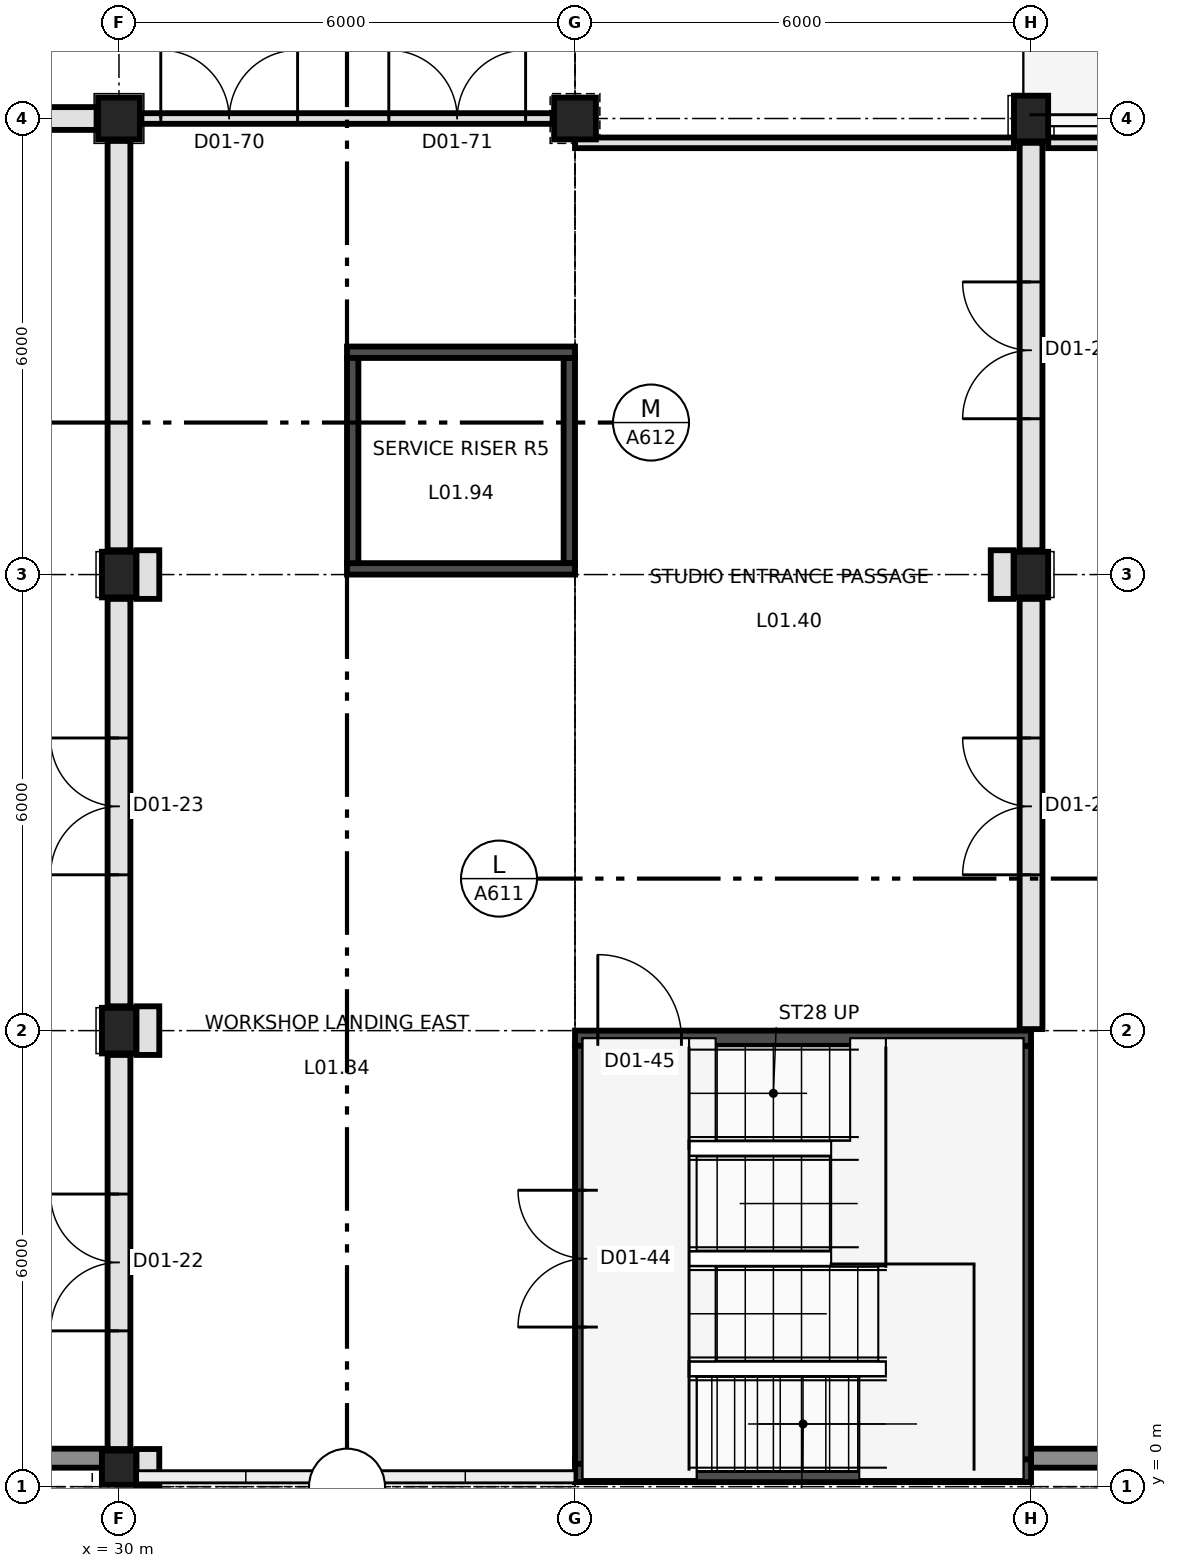
"""IFC4 building model, lengths in metres.
Left out: names, types, materials, properties, quantities, classifications, styles, units other than length and angle.
Written with IfcOpenShell. Run it as: python <this file> out.ifc"""

import sys

from ifc_helpers import new_model, si_unit, direction, frame, frame_2d, origin, origin_2d, place, context, subcontext, project, spatial, rectangle, extrude, element, fill, save


model = new_model("IFC4")
c1 = context("Model", 3, precision=1e-05, world=origin(), true_north=direction((0.0, 1.0)))
c2 = subcontext(c1, "Body", "Model", "MODEL_VIEW")
j1 = project(units=[si_unit("LENGTHUNIT", "METRE"), si_unit("PLANEANGLEUNIT", "RADIAN")], contexts=[c1])
p1 = place(None, origin())
s1 = spatial("IfcSite", under=j1, at=p1, CompositionType="ELEMENT")
p2 = place(p1, origin())
s2 = spatial("IfcBuilding", under=s1, at=p2, CompositionType="ELEMENT")
p3 = place(p2, frame((0.0, 0.0, 7.0)))
s3 = spatial("IfcBuildingStorey", under=s2, at=p3, CompositionType="ELEMENT", Elevation=7.0)
p4 = place(p3, frame((30.0, 0.25, 0.0), z_axis=(0.0, 0.0, 1.0), x_axis=(1.0, 0.0, 0.0)))
e1 = element("IfcColumn", 1, at=p4, inside=s3, PredefinedType="COLUMN", context=c2, shape_type="SweptSolid", body=[
    extrude(rectangle(XDim=0.45, YDim=0.45, at=origin_2d()), origin(), (0.0, 0.0, 1.0), 5.0),
])
for number, where, z_axis, x_axis in (
    (2, (30.0, 6.0, 0.0), (0.0, 0.0, 1.0), (1.0, 0.0, 0.0)),
    (3, (30.0, 12.0, 0.0), (0.0, 0.0, 1.0), (1.0, 0.0, 0.0)),
    (4, (42.0, 12.0, 0.0), (0.0, 0.0, 1.0), (1.0, 0.0, 0.0)),
):
    element("IfcColumn", number, at=place(p3, frame(where, z_axis=z_axis, x_axis=x_axis)), inside=s3, PredefinedType="COLUMN", context=c2, shape_type="SweptSolid", body=[
        extrude(rectangle(XDim=0.45, YDim=0.6, at=origin_2d()), origin(), (0.0, 0.0, 1.0), 5.0),
    ])
for number, where, z_axis, x_axis in (
    (5, (30.0, 18.0, 0.0), (0.0, 0.0, 1.0), (1.0, 0.0, 0.0)),
    (6, (36.0, 18.0, 0.0), (0.0, 0.0, 1.0), (1.0, 0.0, 0.0)),
):
    element("IfcColumn", number, at=place(p3, frame(where, z_axis=z_axis, x_axis=x_axis)), inside=s3, PredefinedType="COLUMN", context=c2, shape_type="SweptSolid", body=[
        extrude(rectangle(XDim=0.55, YDim=0.55, at=origin_2d()), origin(), (0.0, 0.0, 1.0), 5.0),
    ])
p5 = place(p3, frame((42.0, 18.0, 0.0), z_axis=(0.0, 0.0, 1.0), x_axis=(1.0, 0.0, 0.0)))
e7 = element("IfcColumn", 7, at=p5, inside=s3, PredefinedType="COLUMN", context=c2, shape_type="SweptSolid", body=[
    extrude(rectangle(XDim=0.45, YDim=0.6, at=origin_2d()), origin(), (0.0, 0.0, 1.0), 5.0),
])
p6 = place(p3, frame((36.0, 5.9, 0.0), z_axis=(0.0, 0.0, 1.0), x_axis=(1.0, 0.0, 0.0)))
e8 = element("IfcWall", 8, at=p6, inside=s3, PredefinedType="SHEAR", context=c2, shape_type="SweptSolid", body=[
    extrude(rectangle(XDim=6.0, YDim=0.2, at=frame_2d((3.0, 0.0))), origin(), (0.0, 0.0, 1.0), 5.0),
])
p7 = place(p6, frame((0.3, 0.0, 0.0)))
e9 = element("IfcOpeningElement", 9, at=p7, cuts=e8, PredefinedType="OPENING", context=c2, shape_type="SweptSolid", body=[
    extrude(rectangle(XDim=1.1, YDim=2.2, at=frame_2d((0.55, 1.1))), frame((0.0, 0.11, 0.0), z_axis=(0.0, -1.0, 0.0), x_axis=(1.0, 0.0, 0.0)), (0.0, 0.0, 1.0), 0.22),
])
p8 = place(p3, frame((36.0, 0.21, 0.0), z_axis=(0.0, 0.0, 1.0), x_axis=(1.0, 0.0, 0.0)))
e10 = element("IfcWall", 10, at=p8, inside=s3, PredefinedType="SHEAR", context=c2, shape_type="SweptSolid", body=[
    extrude(rectangle(XDim=6.0, YDim=0.3, at=frame_2d((3.0, 0.0))), origin(), (0.0, 0.0, 1.0), 5.0),
])
p9 = place(p3, frame((36.15, 0.3, 0.0), z_axis=(0.0, 0.0, 1.0), x_axis=(0.0, 1.0, 0.0)))
e11 = element("IfcWall", 11, at=p9, inside=s3, PredefinedType="SHEAR", context=c2, shape_type="SweptSolid", body=[
    extrude(rectangle(XDim=5.5, YDim=0.3, at=frame_2d((2.75, 0.0))), origin(), (0.0, 0.0, 1.0), 5.0),
])
p10 = place(p9, frame((1.8, 0.0, 0.0)))
e12 = element("IfcOpeningElement", 12, at=p10, cuts=e11, PredefinedType="OPENING", context=c2, shape_type="SweptSolid", body=[
    extrude(rectangle(XDim=1.8, YDim=2.2, at=frame_2d((0.9, 1.1))), frame((0.0, 0.16, 0.0), z_axis=(0.0, -1.0, 0.0), x_axis=(1.0, 0.0, 0.0)), (0.0, 0.0, 1.0), 0.32),
])
p11 = place(p3, frame((41.9, 0.3, 0.0), z_axis=(0.0, 0.0, 1.0), x_axis=(0.0, 1.0, 0.0)))
e13 = element("IfcWall", 13, at=p11, inside=s3, PredefinedType="SHEAR", context=c2, shape_type="SweptSolid", body=[
    extrude(rectangle(XDim=5.5, YDim=0.2, at=frame_2d((2.75, 0.0))), origin(), (0.0, 0.0, 1.0), 5.0),
])
for number, where, z_axis, x_axis in (
    (14, (33.0, 14.925, 0.0), (0.0, 0.0, 1.0), (1.0, 0.0, 0.0)),
    (15, (33.0, 12.075, 0.0), (0.0, 0.0, 1.0), (1.0, 0.0, 0.0)),
):
    element("IfcWall", number, at=place(p3, frame(where, z_axis=z_axis, x_axis=x_axis)), inside=s3, PredefinedType="SHEAR", context=c2, shape_type="SweptSolid", body=[
        extrude(rectangle(XDim=3.0, YDim=0.15, at=frame_2d((1.5, 0.0))), origin(), (0.0, 0.0, 1.0), 5.0),
    ])
for number, where, z_axis, x_axis in (
    (16, (33.075, 12.15, 0.0), (0.0, 0.0, 1.0), (0.0, 1.0, 0.0)),
    (17, (35.925, 12.15, 0.0), (0.0, 0.0, 1.0), (0.0, 1.0, 0.0)),
):
    element("IfcWall", number, at=place(p3, frame(where, z_axis=z_axis, x_axis=x_axis)), inside=s3, PredefinedType="SHEAR", context=c2, shape_type="SweptSolid", body=[
        extrude(rectangle(XDim=2.7, YDim=0.15, at=frame_2d((1.35, 0.0))), origin(), (0.0, 0.0, 1.0), 5.0),
    ])
p12 = place(p3, frame((47.8, 0.375, 0.0), z_axis=(0.0, 0.0, 1.0), x_axis=(-1.0, 0.0, 0.0)))
e18 = element("IfcWall", 18, at=p12, inside=s3, PredefinedType="SOLIDWALL", context=c2, shape_type="SweptSolid", body=[
    extrude(rectangle(XDim=5.8, YDim=0.25, at=frame_2d((2.9, 0.0))), origin(), (0.0, 0.0, 1.0), 9.5),
])
p13 = place(p3, frame((29.8, 0.375, 0.0), z_axis=(0.0, 0.0, 1.0), x_axis=(-1.0, 0.0, 0.0)))
e19 = element("IfcWall", 19, at=p13, inside=s3, PredefinedType="SOLIDWALL", context=c2, shape_type="SweptSolid", body=[
    extrude(rectangle(XDim=5.6, YDim=0.25, at=frame_2d((2.8, 0.0))), origin(), (0.0, 0.0, 1.0), 8.9),
])
p14 = place(p3, frame((24.32, 18.0, 0.0), z_axis=(0.0, 0.0, 1.0), x_axis=(1.0, 0.0, 0.0)))
e20 = element("IfcWall", 20, at=p14, inside=s3, PredefinedType="PARTITIONING", context=c2, shape_type="SweptSolid", body=[
    extrude(rectangle(XDim=5.385, YDim=0.3, at=frame_2d((2.692, 0.0))), origin(), (0.0, 0.0, 1.0), 4.1),
])
p15 = place(p14, frame((1.73, 0.0, 0.0)))
e21 = element("IfcOpeningElement", 21, at=p15, cuts=e20, PredefinedType="OPENING", context=c2, shape_type="SweptSolid", body=[
    extrude(rectangle(XDim=1.8, YDim=2.1, at=frame_2d((0.9, 1.05))), frame((0.0, 0.16, 0.0), z_axis=(0.0, -1.0, 0.0), x_axis=(1.0, 0.0, 0.0)), (0.0, 0.0, 1.0), 0.32),
])
p16 = place(p3, frame((30.0, 12.32, 0.0), z_axis=(0.0, 0.0, 1.0), x_axis=(0.0, 1.0, 0.0)))
e22 = element("IfcWall", 22, at=p16, inside=s3, PredefinedType="PARTITIONING", context=c2, shape_type="SweptSolid", body=[
    extrude(rectangle(XDim=5.385, YDim=0.3, at=frame_2d((2.692, 0.0))), origin(), (0.0, 0.0, 1.0), 4.1),
])
p17 = place(p3, frame((30.0, 6.32, 0.0), z_axis=(0.0, 0.0, 1.0), x_axis=(0.0, 1.0, 0.0)))
e23 = element("IfcWall", 23, at=p17, inside=s3, PredefinedType="PARTITIONING", context=c2, shape_type="SweptSolid", body=[
    extrude(rectangle(XDim=5.36, YDim=0.3, at=frame_2d((2.68, 0.0))), origin(), (0.0, 0.0, 1.0), 4.1),
])
p18 = place(p17, frame((1.73, 0.0, 0.0)))
e24 = element("IfcOpeningElement", 24, at=p18, cuts=e23, PredefinedType="OPENING", context=c2, shape_type="SweptSolid", body=[
    extrude(rectangle(XDim=1.8, YDim=2.1, at=frame_2d((0.9, 1.05))), frame((0.0, 0.16, 0.0), z_axis=(0.0, -1.0, 0.0), x_axis=(1.0, 0.0, 0.0)), (0.0, 0.0, 1.0), 0.32),
])
p19 = place(p3, frame((30.0, 0.496, 0.0), z_axis=(0.0, 0.0, 1.0), x_axis=(0.0, 1.0, 0.0)))
e25 = element("IfcWall", 25, at=p19, inside=s3, PredefinedType="PARTITIONING", context=c2, shape_type="SweptSolid", body=[
    extrude(rectangle(XDim=5.184, YDim=0.3, at=frame_2d((2.592, 0.0))), origin(), (0.0, 0.0, 1.0), 4.1),
])
p20 = place(p19, frame((1.554, 0.0, 0.0)))
e26 = element("IfcOpeningElement", 26, at=p20, cuts=e25, PredefinedType="OPENING", context=c2, shape_type="SweptSolid", body=[
    extrude(rectangle(XDim=1.8, YDim=2.1, at=frame_2d((0.9, 1.05))), frame((0.0, 0.16, 0.0), z_axis=(0.0, -1.0, 0.0), x_axis=(1.0, 0.0, 0.0)), (0.0, 0.0, 1.0), 0.32),
])
for number, where, z_axis, x_axis in (
    (27, (30.38, 11.68, 0.0), (0.0, 0.0, 1.0), (0.0, 1.0, 0.0)),
    (28, (30.38, 5.68, 0.0), (0.0, 0.0, 1.0), (0.0, 1.0, 0.0)),
):
    element("IfcWall", number, at=place(p3, frame(where, z_axis=z_axis, x_axis=x_axis)), inside=s3, PredefinedType="PARTITIONING", context=c2, shape_type="SweptSolid", body=[
        extrude(rectangle(XDim=0.64, YDim=0.3, at=frame_2d((0.32, 0.0))), origin(), (0.0, 0.0, 1.0), 4.05),
    ])
p21 = place(p3, frame((30.38, 0.006, 0.0), z_axis=(0.0, 0.0, 1.0), x_axis=(0.0, 1.0, 0.0)))
e29 = element("IfcWall", 29, at=p21, inside=s3, PredefinedType="PARTITIONING", context=c2, shape_type="SweptSolid", body=[
    extrude(rectangle(XDim=0.49, YDim=0.3, at=frame_2d((0.245, 0.0))), origin(), (0.0, 0.0, 1.0), 4.1),
])
p22 = place(p3, frame((42.0, 12.32, 0.0), z_axis=(0.0, 0.0, 1.0), x_axis=(0.0, 1.0, 0.0)))
e30 = element("IfcWall", 30, at=p22, inside=s3, PredefinedType="PARTITIONING", context=c2, shape_type="SweptSolid", body=[
    extrude(rectangle(XDim=5.36, YDim=0.3, at=frame_2d((2.68, 0.0))), origin(), (0.0, 0.0, 1.0), 4.1),
])
p23 = place(p22, frame((1.73, 0.0, 0.0)))
e31 = element("IfcOpeningElement", 31, at=p23, cuts=e30, PredefinedType="OPENING", context=c2, shape_type="SweptSolid", body=[
    extrude(rectangle(XDim=1.8, YDim=2.1, at=frame_2d((0.9, 1.05))), frame((0.0, 0.16, 0.0), z_axis=(0.0, -1.0, 0.0), x_axis=(1.0, 0.0, 0.0)), (0.0, 0.0, 1.0), 0.32),
])
p24 = place(p3, frame((42.0, 6.02, 0.0), z_axis=(0.0, 0.0, 1.0), x_axis=(0.0, 1.0, 0.0)))
e32 = element("IfcWall", 32, at=p24, inside=s3, PredefinedType="PARTITIONING", context=c2, shape_type="SweptSolid", body=[
    extrude(rectangle(XDim=5.66, YDim=0.3, at=frame_2d((2.83, 0.0))), origin(), (0.0, 0.0, 1.0), 4.1),
])
p25 = place(p24, frame((2.03, 0.0, 0.0)))
e33 = element("IfcOpeningElement", 33, at=p25, cuts=e32, PredefinedType="OPENING", context=c2, shape_type="SweptSolid", body=[
    extrude(rectangle(XDim=1.8, YDim=2.1, at=frame_2d((0.9, 1.05))), frame((0.0, 0.16, 0.0), z_axis=(0.0, -1.0, 0.0), x_axis=(1.0, 0.0, 0.0)), (0.0, 0.0, 1.0), 0.32),
])
p26 = place(p3, frame((41.62, 11.68, 0.0), z_axis=(0.0, 0.0, 1.0), x_axis=(0.0, 1.0, 0.0)))
e34 = element("IfcWall", 34, at=p26, inside=s3, PredefinedType="PARTITIONING", context=c2, shape_type="SweptSolid", body=[
    extrude(rectangle(XDim=0.64, YDim=0.3, at=frame_2d((0.32, 0.0))), origin(), (0.0, 0.0, 1.0), 4.1),
])
p27 = place(p3, frame((30.295, 18.0, 0.0), z_axis=(0.0, 0.0, 1.0), x_axis=(1.0, 0.0, 0.0)))
e35 = element("IfcWall", 35, at=p27, inside=s3, PredefinedType="PARTITIONING", context=c2, shape_type="SweptSolid", body=[
    extrude(rectangle(XDim=5.41, YDim=0.14, at=frame_2d((2.705, 0.0))), origin(), (0.0, 0.0, 1.0), 4.05),
])
p28 = place(p27, frame((0.255, 0.0, 0.0)))
e36 = element("IfcOpeningElement", 36, at=p28, cuts=e35, PredefinedType="OPENING", context=c2, shape_type="SweptSolid", body=[
    extrude(rectangle(XDim=1.8, YDim=2.1, at=frame_2d((0.9, 1.05))), frame((0.0, 0.08, 0.0), z_axis=(0.0, -1.0, 0.0), x_axis=(1.0, 0.0, 0.0)), (0.0, 0.0, 1.0), 0.16),
])
p29 = place(p27, frame((3.255, 0.0, 0.0)))
e37 = element("IfcOpeningElement", 37, at=p29, cuts=e35, PredefinedType="OPENING", context=c2, shape_type="SweptSolid", body=[
    extrude(rectangle(XDim=1.8, YDim=2.1, at=frame_2d((0.9, 1.05))), frame((0.0, 0.08, 0.0), z_axis=(0.0, -1.0, 0.0), x_axis=(1.0, 0.0, 0.0)), (0.0, 0.0, 1.0), 0.16),
])
p30 = place(p3, frame((36.0, 17.68, 0.0), z_axis=(0.0, 0.0, 1.0), x_axis=(1.0, 0.0, 0.0)))
e38 = element("IfcWall", 38, at=p30, inside=s3, PredefinedType="PARTITIONING", context=c2, shape_type="SweptSolid", body=[
    extrude(rectangle(XDim=5.775, YDim=0.14, at=frame_2d((2.887, 0.0))), origin(), (0.0, 0.0, 1.0), 4.1),
])
p31 = place(p3, frame((42.225, 17.68, 0.0), z_axis=(0.0, 0.0, 1.0), x_axis=(1.0, 0.0, 0.0)))
e39 = element("IfcWall", 39, at=p31, inside=s3, PredefinedType="PARTITIONING", context=c2, shape_type="SweptSolid", body=[
    extrude(rectangle(XDim=11.775, YDim=0.14, at=frame_2d((5.887, 0.0))), origin(), (0.0, 0.0, 1.0), 5.0),
])
p32 = place(p20, frame((1.8, 0.0, 0.0), z_axis=(0.0, 0.0, 1.0), x_axis=(-1.0, 0.0, 0.0)))
e40 = element("IfcDoor", 40, at=p32, inside=s3, OperationType="DOUBLE_DOOR_SINGLE_SWING", PredefinedType="DOOR", context=c2, shape_type="SweptSolid", body=[
    extrude(rectangle(XDim=1.8, YDim=2.1, at=frame_2d((0.9, 1.05))), frame((0.0, 0.025, 0.0), z_axis=(0.0, -1.0, 0.0), x_axis=(1.0, 0.0, 0.0)), (0.0, 0.0, 1.0), 0.05),
])
fill(e26, e40)
p33 = place(p18, frame((1.8, 0.0, 0.0), z_axis=(0.0, 0.0, 1.0), x_axis=(-1.0, 0.0, 0.0)))
e41 = element("IfcDoor", 41, at=p33, inside=s3, OperationType="DOUBLE_DOOR_SINGLE_SWING", PredefinedType="DOOR", context=c2, shape_type="SweptSolid", body=[
    extrude(rectangle(XDim=1.8, YDim=2.1, at=frame_2d((0.9, 1.05))), frame((0.0, 0.025, 0.0), z_axis=(0.0, -1.0, 0.0), x_axis=(1.0, 0.0, 0.0)), (0.0, 0.0, 1.0), 0.05),
])
fill(e24, e41)
p34 = place(p25, origin())
e42 = element("IfcDoor", 42, at=p34, inside=s3, OperationType="DOUBLE_DOOR_SINGLE_SWING", PredefinedType="DOOR", context=c2, shape_type="SweptSolid", body=[
    extrude(rectangle(XDim=1.8, YDim=2.1, at=frame_2d((0.9, 1.05))), frame((0.0, 0.025, 0.0), z_axis=(0.0, -1.0, 0.0), x_axis=(1.0, 0.0, 0.0)), (0.0, 0.0, 1.0), 0.05),
])
fill(e33, e42)
p35 = place(p23, origin())
e43 = element("IfcDoor", 43, at=p35, inside=s3, OperationType="DOUBLE_DOOR_SINGLE_SWING", PredefinedType="DOOR", context=c2, shape_type="SweptSolid", body=[
    extrude(rectangle(XDim=1.8, YDim=2.1, at=frame_2d((0.9, 1.05))), frame((0.0, 0.025, 0.0), z_axis=(0.0, -1.0, 0.0), x_axis=(1.0, 0.0, 0.0)), (0.0, 0.0, 1.0), 0.05),
])
fill(e31, e43)
p36 = place(p10, frame((1.8, 0.0, 0.0), z_axis=(0.0, 0.0, 1.0), x_axis=(-1.0, 0.0, 0.0)))
e44 = element("IfcDoor", 44, at=p36, inside=s3, OperationType="DOUBLE_DOOR_SINGLE_SWING", PredefinedType="DOOR", context=c2, shape_type="SweptSolid", body=[
    extrude(rectangle(XDim=1.8, YDim=2.2, at=frame_2d((0.9, 1.1))), frame((0.0, 0.025, 0.0), z_axis=(0.0, -1.0, 0.0), x_axis=(1.0, 0.0, 0.0)), (0.0, 0.0, 1.0), 0.05),
])
fill(e12, e44)
p37 = place(p7, frame((1.1, 0.0, 0.0), z_axis=(0.0, 0.0, 1.0), x_axis=(-1.0, 0.0, 0.0)))
e45 = element("IfcDoor", 45, at=p37, inside=s3, OperationType="SINGLE_SWING_LEFT", PredefinedType="DOOR", context=c2, shape_type="SweptSolid", body=[
    extrude(rectangle(XDim=1.1, YDim=2.2, at=frame_2d((0.55, 1.1))), frame((0.0, 0.025, 0.0), z_axis=(0.0, -1.0, 0.0), x_axis=(1.0, 0.0, 0.0)), (0.0, 0.0, 1.0), 0.05),
])
fill(e9, e45)
p38 = place(p28, origin())
e46 = element("IfcDoor", 46, at=p38, inside=s3, OperationType="DOUBLE_DOOR_SINGLE_SWING", PredefinedType="DOOR", context=c2, shape_type="SweptSolid", body=[
    extrude(rectangle(XDim=1.8, YDim=2.1, at=frame_2d((0.9, 1.05))), frame((0.0, 0.025, 0.0), z_axis=(0.0, -1.0, 0.0), x_axis=(1.0, 0.0, 0.0)), (0.0, 0.0, 1.0), 0.05),
])
fill(e36, e46)
p39 = place(p29, origin())
e47 = element("IfcDoor", 47, at=p39, inside=s3, OperationType="DOUBLE_DOOR_SINGLE_SWING", PredefinedType="DOOR", context=c2, shape_type="SweptSolid", body=[
    extrude(rectangle(XDim=1.8, YDim=2.1, at=frame_2d((0.9, 1.05))), frame((0.0, 0.025, 0.0), z_axis=(0.0, -1.0, 0.0), x_axis=(1.0, 0.0, 0.0)), (0.0, 0.0, 1.0), 0.05),
])
fill(e37, e47)
save(model, sys.argv[1])
